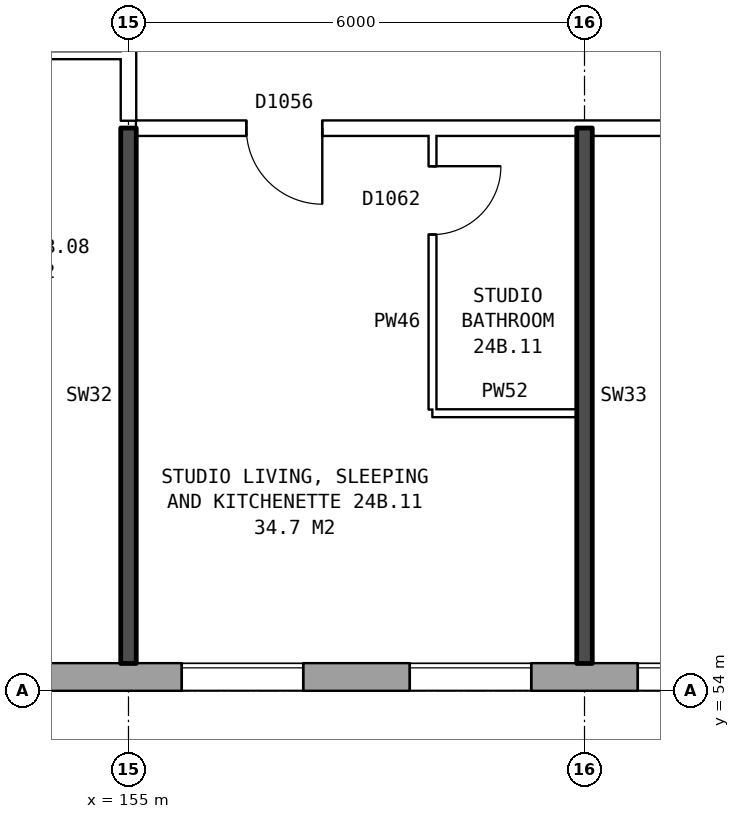
"""IFC4 building model, lengths in metres.
Left out: names, types, materials, properties, quantities, classifications, styles, units other than length and angle.
Written with IfcOpenShell. Run it as: python <this file> out.ifc"""

import sys

from ifc_helpers import new_model, si_unit, direction, frame, frame_2d, origin, place, context, subcontext, project, spatial, rectangle, extrude, element, fill, save


model = new_model("IFC4")
c1 = context("Model", 3, precision=1e-05, world=origin(), true_north=direction((0.0, 1.0)))
c2 = subcontext(c1, "Body", "Model", "MODEL_VIEW")
j1 = project(units=[si_unit("LENGTHUNIT", "METRE"), si_unit("PLANEANGLEUNIT", "RADIAN")], contexts=[c1])
p1 = place(None, origin())
s1 = spatial("IfcSite", under=j1, at=p1, CompositionType="ELEMENT")
p2 = place(p1, origin())
s2 = spatial("IfcBuilding", under=s1, at=p2, CompositionType="ELEMENT")
p3 = place(p2, frame((0.0, 0.0, 87.1)))
s3 = spatial("IfcBuildingStorey", under=s2, at=p3, CompositionType="ELEMENT", Elevation=87.1)
p4 = place(p3, frame((134.075, 54.18, 0.0), z_axis=(0.0, 0.0, 1.0), x_axis=(1.0, 0.0, 0.0)))
e1 = element("IfcWall", 1, at=p4, inside=s3, PredefinedType="STANDARD", context=c2, shape_type="SweptSolid", body=[
    extrude(rectangle(XDim=38.101, YDim=0.36, at=frame_2d((19.05, 0.0))), origin(), (0.0, 0.0, 1.0), 2.85),
])
p5 = place(p4, frame((0.625, 0.0, 0.8)))
e2 = element("IfcOpeningElement", 2, at=p5, cuts=e1, PredefinedType="OPENING", context=c2, shape_type="SweptSolid", body=[
    extrude(rectangle(XDim=1.6, YDim=1.8, at=frame_2d((0.8, 0.9))), frame((0.0, 0.19, 0.0), z_axis=(0.0, -1.0, 0.0), x_axis=(1.0, 0.0, 0.0)), (0.0, 0.0, 1.0), 0.38),
])
p6 = place(p4, frame((3.625, 0.0, 0.8)))
e3 = element("IfcOpeningElement", 3, at=p6, cuts=e1, PredefinedType="OPENING", context=c2, shape_type="SweptSolid", body=[
    extrude(rectangle(XDim=1.6, YDim=1.8, at=frame_2d((0.8, 0.9))), frame((0.0, 0.19, 0.0), z_axis=(0.0, -1.0, 0.0), x_axis=(1.0, 0.0, 0.0)), (0.0, 0.0, 1.0), 0.38),
])
p7 = place(p4, frame((6.625, 0.0, 0.8)))
e4 = element("IfcOpeningElement", 4, at=p7, cuts=e1, PredefinedType="OPENING", context=c2, shape_type="SweptSolid", body=[
    extrude(rectangle(XDim=1.6, YDim=1.8, at=frame_2d((0.8, 0.9))), frame((0.0, 0.19, 0.0), z_axis=(0.0, -1.0, 0.0), x_axis=(1.0, 0.0, 0.0)), (0.0, 0.0, 1.0), 0.38),
])
p8 = place(p4, frame((9.625, 0.0, 0.8)))
e5 = element("IfcOpeningElement", 5, at=p8, cuts=e1, PredefinedType="OPENING", context=c2, shape_type="SweptSolid", body=[
    extrude(rectangle(XDim=1.6, YDim=1.8, at=frame_2d((0.8, 0.9))), frame((0.0, 0.19, 0.0), z_axis=(0.0, -1.0, 0.0), x_axis=(1.0, 0.0, 0.0)), (0.0, 0.0, 1.0), 0.38),
])
p9 = place(p4, frame((12.625, 0.0, 0.8)))
e6 = element("IfcOpeningElement", 6, at=p9, cuts=e1, PredefinedType="OPENING", context=c2, shape_type="SweptSolid", body=[
    extrude(rectangle(XDim=1.6, YDim=1.8, at=frame_2d((0.8, 0.9))), frame((0.0, 0.19, 0.0), z_axis=(0.0, -1.0, 0.0), x_axis=(1.0, 0.0, 0.0)), (0.0, 0.0, 1.0), 0.38),
])
p10 = place(p4, frame((15.125, 0.0, 0.8)))
e7 = element("IfcOpeningElement", 7, at=p10, cuts=e1, PredefinedType="OPENING", context=c2, shape_type="SweptSolid", body=[
    extrude(rectangle(XDim=1.4, YDim=1.8, at=frame_2d((0.7, 0.9))), frame((0.0, 0.19, 0.0), z_axis=(0.0, -1.0, 0.0), x_axis=(1.0, 0.0, 0.0)), (0.0, 0.0, 1.0), 0.38),
])
p11 = place(p4, frame((18.325, 0.0, 0.15)))
e8 = element("IfcOpeningElement", 8, at=p11, cuts=e1, PredefinedType="OPENING", context=c2, shape_type="SweptSolid", body=[
    extrude(rectangle(XDim=1.4, YDim=1.2, at=frame_2d((0.7, 0.6))), frame((0.0, 0.19, 0.0), z_axis=(0.0, -1.0, 0.0), x_axis=(1.0, 0.0, 0.0)), (0.0, 0.0, 1.0), 0.38),
])
p12 = place(p4, frame((21.625, 0.0, 0.8)))
e9 = element("IfcOpeningElement", 9, at=p12, cuts=e1, PredefinedType="OPENING", context=c2, shape_type="SweptSolid", body=[
    extrude(rectangle(XDim=1.6, YDim=1.8, at=frame_2d((0.8, 0.9))), frame((0.0, 0.19, 0.0), z_axis=(0.0, -1.0, 0.0), x_axis=(1.0, 0.0, 0.0)), (0.0, 0.0, 1.0), 0.38),
])
p13 = place(p4, frame((24.625, 0.0, 0.8)))
e10 = element("IfcOpeningElement", 10, at=p13, cuts=e1, PredefinedType="OPENING", context=c2, shape_type="SweptSolid", body=[
    extrude(rectangle(XDim=1.6, YDim=1.8, at=frame_2d((0.8, 0.9))), frame((0.0, 0.19, 0.0), z_axis=(0.0, -1.0, 0.0), x_axis=(1.0, 0.0, 0.0)), (0.0, 0.0, 1.0), 0.38),
])
p14 = place(p4, frame((27.625, 0.0, 0.8)))
e11 = element("IfcOpeningElement", 11, at=p14, cuts=e1, PredefinedType="OPENING", context=c2, shape_type="SweptSolid", body=[
    extrude(rectangle(XDim=1.6, YDim=1.8, at=frame_2d((0.8, 0.9))), frame((0.0, 0.19, 0.0), z_axis=(0.0, -1.0, 0.0), x_axis=(1.0, 0.0, 0.0)), (0.0, 0.0, 1.0), 0.38),
])
p15 = place(p4, frame((30.625, 0.0, 0.8)))
e12 = element("IfcOpeningElement", 12, at=p15, cuts=e1, PredefinedType="OPENING", context=c2, shape_type="SweptSolid", body=[
    extrude(rectangle(XDim=1.6, YDim=1.8, at=frame_2d((0.8, 0.9))), frame((0.0, 0.19, 0.0), z_axis=(0.0, -1.0, 0.0), x_axis=(1.0, 0.0, 0.0)), (0.0, 0.0, 1.0), 0.38),
])
p16 = place(p4, frame((33.625, 0.0, 0.8)))
e13 = element("IfcOpeningElement", 13, at=p16, cuts=e1, PredefinedType="OPENING", context=c2, shape_type="SweptSolid", body=[
    extrude(rectangle(XDim=1.6, YDim=1.8, at=frame_2d((0.8, 0.9))), frame((0.0, 0.19, 0.0), z_axis=(0.0, -1.0, 0.0), x_axis=(1.0, 0.0, 0.0)), (0.0, 0.0, 1.0), 0.38),
])
p17 = place(p4, frame((16.825, 0.0, 1.7)))
e14 = element("IfcOpeningElement", 14, at=p17, cuts=e1, PredefinedType="OPENING", context=c2, shape_type="SweptSolid", body=[
    extrude(rectangle(XDim=0.6, YDim=0.9, at=frame_2d((0.3, 0.45))), frame((0.0, 0.19, 0.0), z_axis=(0.0, -1.0, 0.0), x_axis=(1.0, 0.0, 0.0)), (0.0, 0.0, 1.0), 0.38),
])
p18 = place(p3, frame((159.0, 57.65, 0.0), z_axis=(0.0, 0.0, 1.0), x_axis=(1.0, 0.0, 0.0)))
e15 = element("IfcWall", 15, at=p18, inside=s3, PredefinedType="PARTITIONING", context=c2, shape_type="SweptSolid", body=[
    extrude(rectangle(XDim=1.9, YDim=0.1, at=frame_2d((0.95, 0.0))), origin(), (0.0, 0.0, 1.0), 2.85),
])
p19 = place(p3, frame((155.1, 61.4, 0.0), z_axis=(0.0, 0.0, 1.0), x_axis=(1.0, 0.0, 0.0)))
e16 = element("IfcWall", 16, at=p19, inside=s3, PredefinedType="PARTITIONING", context=c2, shape_type="SweptSolid", body=[
    extrude(rectangle(XDim=19.79, YDim=0.2, at=frame_2d((9.895, 0.0))), origin(), (0.0, 0.0, 1.0), 2.85),
])
p20 = place(p19, frame((1.45, 0.0, 0.0)))
e17 = element("IfcOpeningElement", 17, at=p20, cuts=e16, PredefinedType="OPENING", context=c2, shape_type="SweptSolid", body=[
    extrude(rectangle(XDim=1.0, YDim=2.1, at=frame_2d((0.5, 1.05))), frame((0.0, 0.11, 0.0), z_axis=(0.0, -1.0, 0.0), x_axis=(1.0, 0.0, 0.0)), (0.0, 0.0, 1.0), 0.22),
])
p21 = place(p19, frame((7.4, 0.0, 0.0)))
e18 = element("IfcOpeningElement", 18, at=p21, cuts=e16, PredefinedType="OPENING", context=c2, shape_type="SweptSolid", body=[
    extrude(rectangle(XDim=1.0, YDim=2.1, at=frame_2d((0.5, 1.05))), frame((0.0, 0.11, 0.0), z_axis=(0.0, -1.0, 0.0), x_axis=(1.0, 0.0, 0.0)), (0.0, 0.0, 1.0), 0.22),
])
p22 = place(p19, frame((13.2, 0.0, 0.0)))
e19 = element("IfcOpeningElement", 19, at=p22, cuts=e16, PredefinedType="OPENING", context=c2, shape_type="SweptSolid", body=[
    extrude(rectangle(XDim=1.0, YDim=2.1, at=frame_2d((0.5, 1.05))), frame((0.0, 0.11, 0.0), z_axis=(0.0, -1.0, 0.0), x_axis=(1.0, 0.0, 0.0)), (0.0, 0.0, 1.0), 0.22),
])
p23 = place(p3, frame((152.0, 62.36, 0.0), z_axis=(0.0, 0.0, 1.0), x_axis=(1.0, 0.0, 0.0)))
e20 = element("IfcWall", 20, at=p23, inside=s3, PredefinedType="PARTITIONING", context=c2, shape_type="SweptSolid", body=[
    extrude(rectangle(XDim=2.9, YDim=0.1, at=frame_2d((1.45, 0.0))), origin(), (0.0, 0.0, 1.0), 2.85),
])
p24 = place(p23, frame((1.0, 0.0, 0.0)))
e21 = element("IfcOpeningElement", 21, at=p24, cuts=e20, PredefinedType="OPENING", context=c2, shape_type="SweptSolid", body=[
    extrude(rectangle(XDim=0.9, YDim=2.1, at=frame_2d((0.45, 1.05))), frame((0.0, 0.06, 0.0), z_axis=(0.0, -1.0, 0.0), x_axis=(1.0, 0.0, 0.0)), (0.0, 0.0, 1.0), 0.12),
])
p25 = place(p3, frame((155.0, 54.36, 0.0), z_axis=(0.0, 0.0, 1.0), x_axis=(0.0, 1.0, 0.0)))
e22 = element("IfcWall", 22, at=p25, inside=s3, PredefinedType="SOLIDWALL", context=c2, shape_type="SweptSolid", body=[
    extrude(rectangle(XDim=7.04, YDim=0.2, at=frame_2d((3.52, 0.0))), origin(), (0.0, 0.0, 1.0), 2.85),
])
p26 = place(p3, frame((155.0, 61.5, 0.0), z_axis=(0.0, 0.0, 1.0), x_axis=(0.0, 1.0, 0.0)))
e23 = element("IfcWall", 23, at=p26, inside=s3, PredefinedType="PARTITIONING", context=c2, shape_type="SweptSolid", body=[
    extrude(rectangle(XDim=2.2, YDim=0.2, at=frame_2d((1.1, 0.0))), origin(), (0.0, 0.0, 1.0), 2.85),
])
p27 = place(p3, frame((159.0, 57.7, 0.0), z_axis=(0.0, 0.0, 1.0), x_axis=(0.0, 1.0, 0.0)))
e24 = element("IfcWall", 24, at=p27, inside=s3, PredefinedType="PARTITIONING", context=c2, shape_type="SweptSolid", body=[
    extrude(rectangle(XDim=3.6, YDim=0.1, at=frame_2d((1.8, 0.0))), origin(), (0.0, 0.0, 1.0), 2.85),
])
p28 = place(p27, frame((2.3, 0.0, 0.0)))
e25 = element("IfcOpeningElement", 25, at=p28, cuts=e24, PredefinedType="OPENING", context=c2, shape_type="SweptSolid", body=[
    extrude(rectangle(XDim=0.9, YDim=2.1, at=frame_2d((0.45, 1.05))), frame((0.0, 0.06, 0.0), z_axis=(0.0, -1.0, 0.0), x_axis=(1.0, 0.0, 0.0)), (0.0, 0.0, 1.0), 0.12),
])
p29 = place(p3, frame((161.0, 54.36, 0.0), z_axis=(0.0, 0.0, 1.0), x_axis=(0.0, 1.0, 0.0)))
e26 = element("IfcWall", 26, at=p29, inside=s3, PredefinedType="SOLIDWALL", context=c2, shape_type="SweptSolid", body=[
    extrude(rectangle(XDim=7.04, YDim=0.2, at=frame_2d((3.52, 0.0))), origin(), (0.0, 0.0, 1.0), 2.85),
])
p30 = place(p12, origin())
e27 = element("IfcWindow", 27, at=p30, inside=s3, PartitioningType="SINGLE_PANEL", PredefinedType="WINDOW", context=c2, shape_type="SweptSolid", body=[
    extrude(rectangle(XDim=1.6, YDim=1.8, at=frame_2d((0.8, 0.9))), frame((0.0, 0.15, 0.0), z_axis=(0.0, -1.0, 0.0), x_axis=(1.0, 0.0, 0.0)), (0.0, 0.0, 1.0), 0.06),
])
fill(e9, e27)
p31 = place(p13, origin())
e28 = element("IfcWindow", 28, at=p31, inside=s3, PartitioningType="SINGLE_PANEL", PredefinedType="WINDOW", context=c2, shape_type="SweptSolid", body=[
    extrude(rectangle(XDim=1.6, YDim=1.8, at=frame_2d((0.8, 0.9))), frame((0.0, 0.15, 0.0), z_axis=(0.0, -1.0, 0.0), x_axis=(1.0, 0.0, 0.0)), (0.0, 0.0, 1.0), 0.06),
])
fill(e10, e28)
p32 = place(p14, origin())
e29 = element("IfcWindow", 29, at=p32, inside=s3, PartitioningType="SINGLE_PANEL", PredefinedType="WINDOW", context=c2, shape_type="SweptSolid", body=[
    extrude(rectangle(XDim=1.6, YDim=1.8, at=frame_2d((0.8, 0.9))), frame((0.0, 0.15, 0.0), z_axis=(0.0, -1.0, 0.0), x_axis=(1.0, 0.0, 0.0)), (0.0, 0.0, 1.0), 0.06),
])
fill(e11, e29)
p33 = place(p20, frame((1.0, 0.0, 0.0), z_axis=(0.0, 0.0, 1.0), x_axis=(-1.0, 0.0, 0.0)))
e30 = element("IfcDoor", 30, at=p33, inside=s3, OperationType="SINGLE_SWING_LEFT", PredefinedType="DOOR", context=c2, shape_type="SweptSolid", body=[
    extrude(rectangle(XDim=1.0, YDim=2.1, at=frame_2d((0.5, 1.05))), frame((0.0, 0.025, 0.0), z_axis=(0.0, -1.0, 0.0), x_axis=(1.0, 0.0, 0.0)), (0.0, 0.0, 1.0), 0.05),
])
fill(e17, e30)
p34 = place(p28, frame((0.9, 0.0, 0.0), z_axis=(0.0, 0.0, 1.0), x_axis=(-1.0, 0.0, 0.0)))
e31 = element("IfcDoor", 31, at=p34, inside=s3, OperationType="SINGLE_SWING_LEFT", PredefinedType="DOOR", context=c2, shape_type="SweptSolid", body=[
    extrude(rectangle(XDim=0.9, YDim=2.1, at=frame_2d((0.45, 1.05))), frame((0.0, 0.025, 0.0), z_axis=(0.0, -1.0, 0.0), x_axis=(1.0, 0.0, 0.0)), (0.0, 0.0, 1.0), 0.05),
])
fill(e25, e31)
save(model, sys.argv[1])
